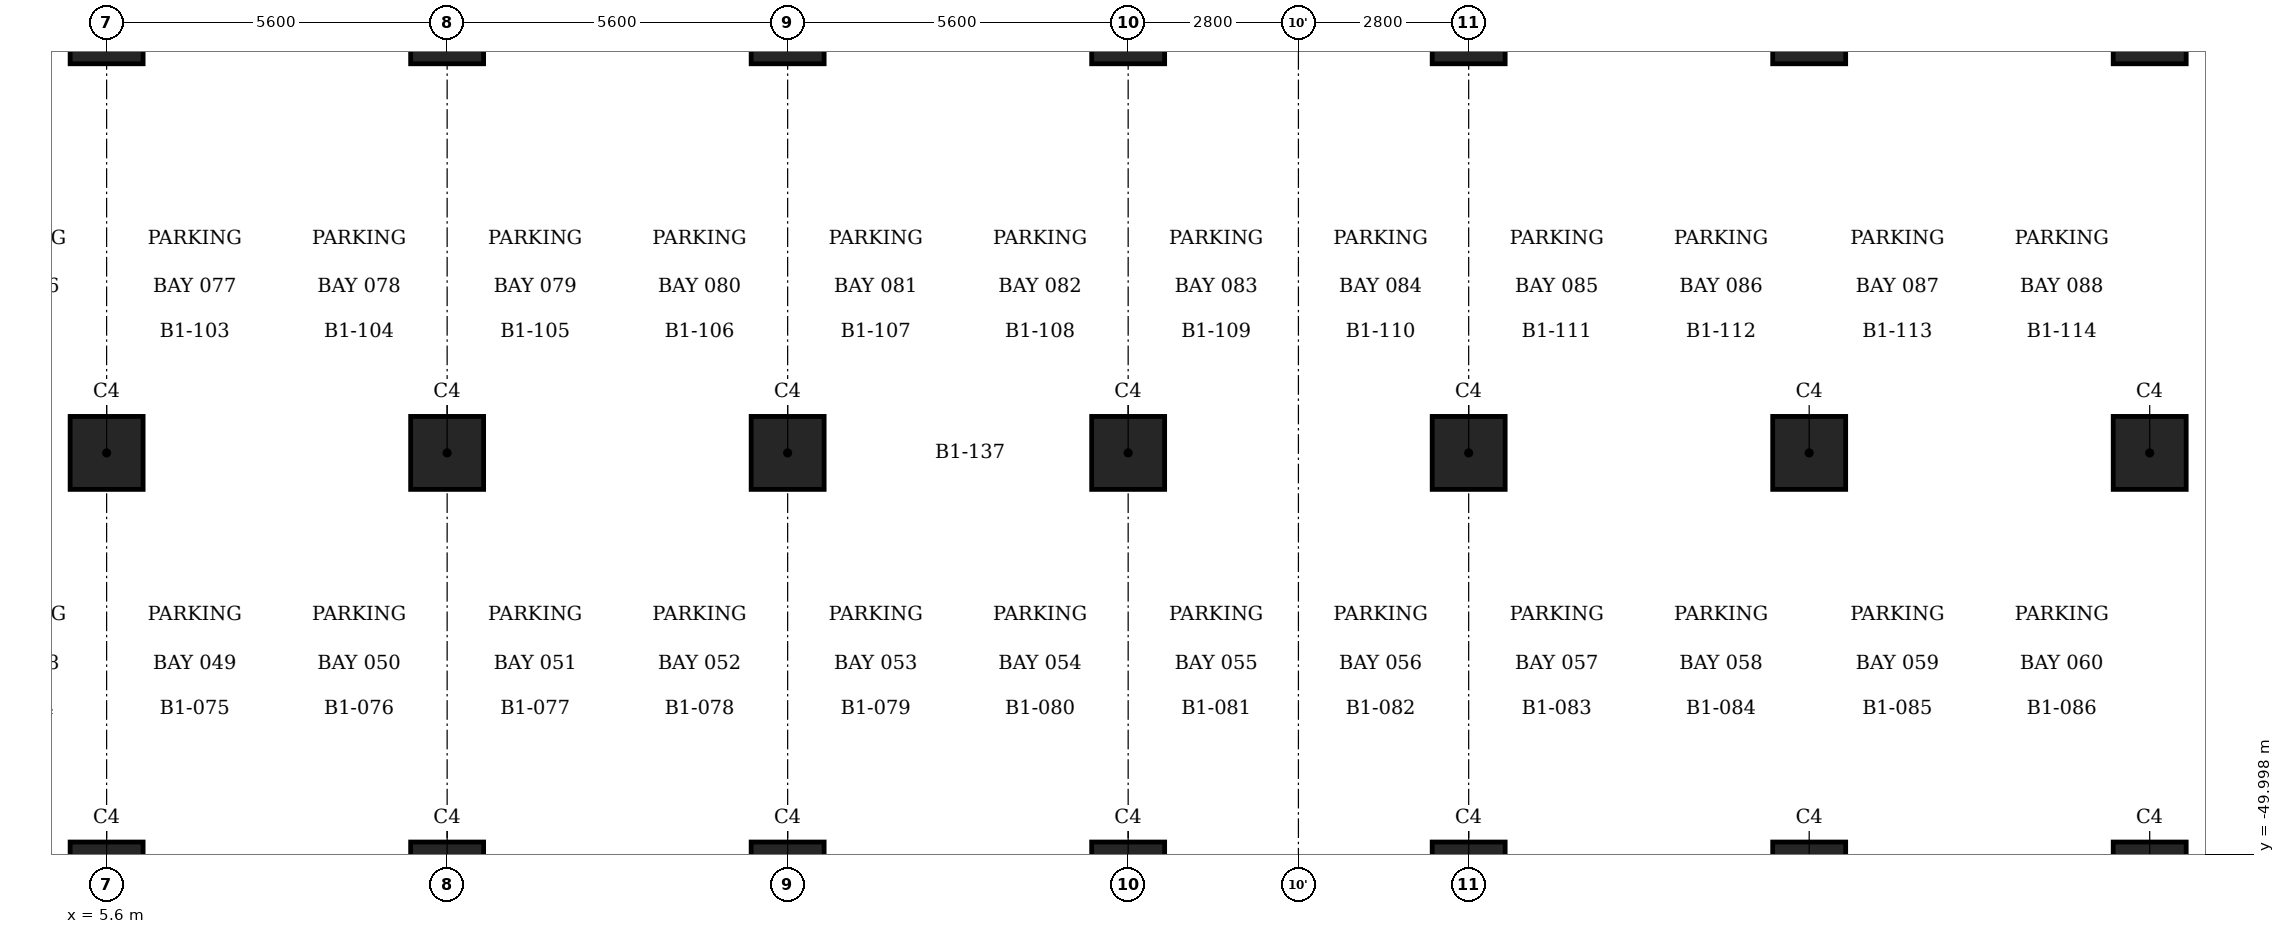
"""IFC4 building model, lengths in metres.
Left out: names, types, materials, properties, quantities, classifications, styles, units other than length and angle.
Written with IfcOpenShell. Run it as: python <this file> out.ifc"""

import sys

from ifc_helpers import new_model, si_unit, direction, frame, origin, origin_2d, place, context, subcontext, project, spatial, circle, extrude, element, save


model = new_model("IFC4")
c1 = context("Model", 3, precision=1e-05, world=origin(), true_north=direction((0.0, 1.0)))
c2 = subcontext(c1, "Body", "Model", "MODEL_VIEW")
j1 = project(units=[si_unit("LENGTHUNIT", "METRE"), si_unit("PLANEANGLEUNIT", "RADIAN")], contexts=[c1])
p1 = place(None, origin())
s1 = spatial("IfcSite", under=j1, at=p1, CompositionType="ELEMENT")
p2 = place(p1, origin())
s2 = spatial("IfcBuilding", under=s1, at=p2, CompositionType="ELEMENT")
p3 = place(p2, frame((0.0, 0.0, -4.5)))
s3 = spatial("IfcBuildingStorey", under=s2, at=p3, CompositionType="ELEMENT", Elevation=-4.5)
for number, where, z_axis, x_axis in (
    (1, (5.6, -36.4, 0.0), (0.0, 0.0, 1.0), (1.0, 0.0, 0.0)),
    (2, (11.2, -36.4, 0.0), (0.0, 0.0, 1.0), (1.0, 0.0, 0.0)),
    (3, (16.8, -36.4, 0.0), (0.0, 0.0, 1.0), (1.0, 0.0, 0.0)),
    (4, (22.4, -36.4, 0.0), (0.0, 0.0, 1.0), (1.0, 0.0, 0.0)),
    (5, (28.0, -36.4, 0.0), (0.0, 0.0, 1.0), (1.0, 0.0, 0.0)),
    (6, (33.6, -36.4, 0.0), (0.0, 0.0, 1.0), (1.0, 0.0, 0.0)),
    (7, (39.2, -36.4, 0.0), (0.0, 0.0, 1.0), (1.0, 0.0, 0.0)),
    (8, (5.6, -43.4, 0.0), (0.0, 0.0, 1.0), (1.0, 0.0, 0.0)),
    (9, (11.2, -43.4, 0.0), (0.0, 0.0, 1.0), (1.0, 0.0, 0.0)),
    (10, (16.8, -43.4, 0.0), (0.0, 0.0, 1.0), (1.0, 0.0, 0.0)),
    (11, (22.4, -43.4, 0.0), (0.0, 0.0, 1.0), (1.0, 0.0, 0.0)),
    (12, (28.0, -43.4, 0.0), (0.0, 0.0, 1.0), (1.0, 0.0, 0.0)),
    (13, (33.6, -43.4, 0.0), (0.0, 0.0, 1.0), (1.0, 0.0, 0.0)),
    (14, (39.2, -43.4, 0.0), (0.0, 0.0, 1.0), (1.0, 0.0, 0.0)),
    (15, (5.6, -50.4, 0.0), (0.0, 0.0, 1.0), (1.0, 0.0, 0.0)),
    (16, (11.2, -50.4, 0.0), (0.0, 0.0, 1.0), (1.0, 0.0, 0.0)),
    (17, (16.8, -50.4, 0.0), (0.0, 0.0, 1.0), (1.0, 0.0, 0.0)),
    (18, (22.4, -50.4, 0.0), (0.0, 0.0, 1.0), (1.0, 0.0, 0.0)),
    (19, (28.0, -50.4, 0.0), (0.0, 0.0, 1.0), (1.0, 0.0, 0.0)),
    (20, (33.6, -50.4, 0.0), (0.0, 0.0, 1.0), (1.0, 0.0, 0.0)),
    (21, (39.2, -50.4, 0.0), (0.0, 0.0, 1.0), (1.0, 0.0, 0.0)),
):
    element("IfcColumn", number, at=place(p3, frame(where, z_axis=z_axis, x_axis=x_axis)), inside=s3, PredefinedType="COLUMN", context=c2, shape_type="SweptSolid", body=[
        extrude(circle(Radius=0.6, at=origin_2d()), origin(), (0.0, 0.0, 1.0), 4.5),
    ])
save(model, sys.argv[1])
